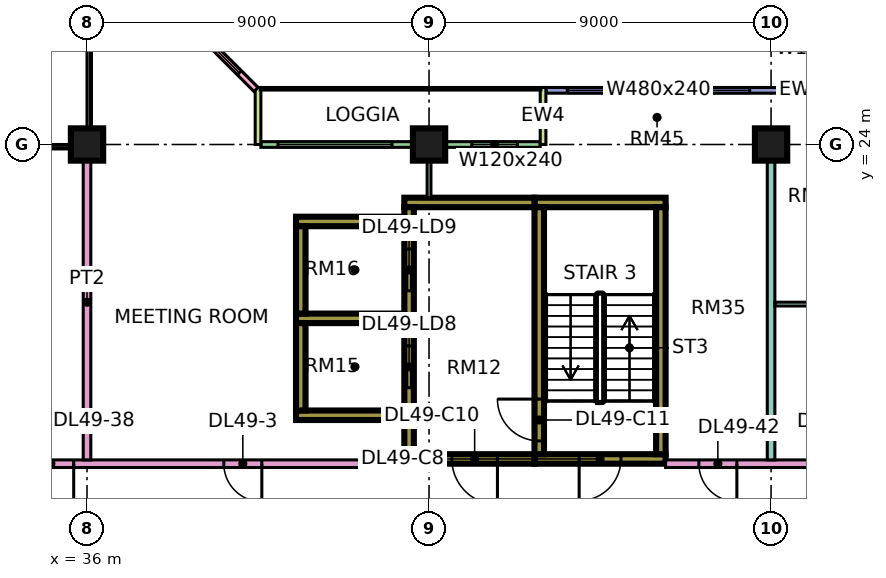
"""IFC4 building model, lengths in metres.
Left out: names, types, materials, properties, quantities, classifications, styles, units other than length and angle.
Written with IfcOpenShell. Run it as: python <this file> out.ifc"""

import sys

from ifc_helpers import new_model, si_unit, direction, frame, frame_2d, origin, origin_2d, place, context, subcontext, project, spatial, rectangle, extrude, element, fill, save


model = new_model("IFC4")
c1 = context("Model", 3, precision=1e-05, world=origin(), true_north=direction((0.0, 1.0)))
c2 = subcontext(c1, "Body", "Model", "MODEL_VIEW")
j1 = project(units=[si_unit("LENGTHUNIT", "METRE"), si_unit("PLANEANGLEUNIT", "RADIAN")], contexts=[c1])
p1 = place(None, origin())
s1 = spatial("IfcSite", under=j1, at=p1, CompositionType="ELEMENT")
p2 = place(p1, origin())
s2 = spatial("IfcBuilding", under=s1, at=p2, CompositionType="ELEMENT")
p3 = place(p2, frame((0.0, 0.0, 211.65)))
s3 = spatial("IfcBuildingStorey", under=s2, at=p3, CompositionType="ELEMENT", Elevation=211.65)
for number, where, z_axis, x_axis in (
    (1, (36.0, 24.0, 0.0), (0.0, 0.0, 1.0), (1.0, 0.0, 0.0)),
    (2, (45.0, 24.0, 0.0), (0.0, 0.0, 1.0), (1.0, 0.0, 0.0)),
    (3, (54.0, 24.0, 0.0), (0.0, 0.0, 1.0), (1.0, 0.0, 0.0)),
):
    element("IfcColumn", number, at=place(p3, frame(where, z_axis=z_axis, x_axis=x_axis)), inside=s3, PredefinedType="COLUMN", context=c2, shape_type="SweptSolid", body=[
        extrude(rectangle(XDim=0.85, YDim=0.85, at=origin_2d()), origin(), (0.0, 0.0, 1.0), 3.75),
    ])
p4 = place(p3, frame((47.775, 15.725, 0.0), z_axis=(0.0, 0.0, 1.0), x_axis=(1.0, 0.0, 0.0)))
e4 = element("IfcWall", 4, at=p4, inside=s3, PredefinedType="SHEAR", context=c2, shape_type="SweptSolid", body=[
    extrude(rectangle(XDim=3.45, YDim=0.25, at=frame_2d((1.725, 0.0))), origin(), (0.0, 0.0, 1.0), 3.75),
])
p5 = place(p4, frame((1.175, 0.0, 0.0)))
e5 = element("IfcOpeningElement", 5, at=p5, cuts=e4, PredefinedType="OPENING", context=c2, shape_type="SweptSolid", body=[
    extrude(rectangle(XDim=1.1, YDim=2.2, at=frame_2d((0.55, 1.1))), frame((0.0, 0.135, 0.0), z_axis=(0.0, -1.0, 0.0), x_axis=(1.0, 0.0, 0.0)), (0.0, 0.0, 1.0), 0.27),
])
p6 = place(p3, frame((47.775, 22.475, 0.0), z_axis=(0.0, 0.0, 1.0), x_axis=(1.0, 0.0, 0.0)))
e6 = element("IfcWall", 6, at=p6, inside=s3, PredefinedType="SHEAR", context=c2, shape_type="SweptSolid", body=[
    extrude(rectangle(XDim=3.45, YDim=0.25, at=frame_2d((1.725, 0.0))), origin(), (0.0, 0.0, 1.0), 3.75),
])
p7 = place(p3, frame((47.9, 15.85, 0.0), z_axis=(0.0, 0.0, 1.0), x_axis=(0.0, 1.0, 0.0)))
e7 = element("IfcWall", 7, at=p7, inside=s3, PredefinedType="SHEAR", context=c2, shape_type="SweptSolid", body=[
    extrude(rectangle(XDim=6.5, YDim=0.25, at=frame_2d((3.25, 0.0))), origin(), (0.0, 0.0, 1.0), 3.75),
])
p8 = place(p7, frame((0.35, 0.0, 0.0)))
e8 = element("IfcOpeningElement", 8, at=p8, cuts=e7, PredefinedType="OPENING", context=c2, shape_type="SweptSolid", body=[
    extrude(rectangle(XDim=1.1, YDim=2.2, at=frame_2d((0.55, 1.1))), frame((0.0, 0.135, 0.0), z_axis=(0.0, -1.0, 0.0), x_axis=(1.0, 0.0, 0.0)), (0.0, 0.0, 1.0), 0.27),
])
p9 = place(p3, frame((51.1, 15.85, 0.0), z_axis=(0.0, 0.0, 1.0), x_axis=(0.0, 1.0, 0.0)))
e9 = element("IfcWall", 9, at=p9, inside=s3, PredefinedType="SHEAR", context=c2, shape_type="SweptSolid", body=[
    extrude(rectangle(XDim=6.5, YDim=0.25, at=frame_2d((3.25, 0.0))), origin(), (0.0, 0.0, 1.0), 3.75),
])
p10 = place(p3, frame((44.35, 15.725, 0.0), z_axis=(0.0, 0.0, 1.0), x_axis=(1.0, 0.0, 0.0)))
e10 = element("IfcWall", 10, at=p10, inside=s3, PredefinedType="SHEAR", context=c2, shape_type="SweptSolid", body=[
    extrude(rectangle(XDim=3.425, YDim=0.25, at=frame_2d((1.712, 0.0))), origin(), (0.0, 0.0, 1.0), 3.75),
])
p11 = place(p10, frame((1.25, 0.0, 0.0)))
e11 = element("IfcOpeningElement", 11, at=p11, cuts=e10, PredefinedType="OPENING", context=c2, shape_type="SweptSolid", body=[
    extrude(rectangle(XDim=1.2, YDim=2.2, at=frame_2d((0.6, 1.1))), frame((0.0, 0.135, 0.0), z_axis=(0.0, -1.0, 0.0), x_axis=(1.0, 0.0, 0.0)), (0.0, 0.0, 1.0), 0.27),
])
p12 = place(p3, frame((44.35, 22.475, 0.0), z_axis=(0.0, 0.0, 1.0), x_axis=(1.0, 0.0, 0.0)))
e12 = element("IfcWall", 12, at=p12, inside=s3, PredefinedType="SHEAR", context=c2, shape_type="SweptSolid", body=[
    extrude(rectangle(XDim=3.425, YDim=0.25, at=frame_2d((1.712, 0.0))), origin(), (0.0, 0.0, 1.0), 3.75),
])
p13 = place(p3, frame((44.475, 15.85, 0.0), z_axis=(0.0, 0.0, 1.0), x_axis=(0.0, 1.0, 0.0)))
e13 = element("IfcWall", 13, at=p13, inside=s3, PredefinedType="SHEAR", context=c2, shape_type="SweptSolid", body=[
    extrude(rectangle(XDim=6.5, YDim=0.25, at=frame_2d((3.25, 0.0))), origin(), (0.0, 0.0, 1.0), 3.75),
])
p14 = place(p13, frame((1.75, 0.0, 0.0)))
e14 = element("IfcOpeningElement", 14, at=p14, cuts=e13, PredefinedType="OPENING", context=c2, shape_type="SweptSolid", body=[
    extrude(rectangle(XDim=1.1, YDim=2.2, at=frame_2d((0.55, 1.1))), frame((0.0, 0.135, 0.0), z_axis=(0.0, -1.0, 0.0), x_axis=(1.0, 0.0, 0.0)), (0.0, 0.0, 1.0), 0.27),
])
p15 = place(p13, frame((4.3, 0.0, 0.0)))
e15 = element("IfcOpeningElement", 15, at=p15, cuts=e13, PredefinedType="OPENING", context=c2, shape_type="SweptSolid", body=[
    extrude(rectangle(XDim=1.1, YDim=2.2, at=frame_2d((0.55, 1.1))), frame((0.0, 0.135, 0.0), z_axis=(0.0, -1.0, 0.0), x_axis=(1.0, 0.0, 0.0)), (0.0, 0.0, 1.0), 0.27),
])
for number, where, z_axis, x_axis in (
    (16, (41.5, 16.875, 0.0), (0.0, 0.0, 1.0), (1.0, 0.0, 0.0)),
    (17, (41.5, 19.425, 0.0), (0.0, 0.0, 1.0), (1.0, 0.0, 0.0)),
    (18, (41.5, 21.975, 0.0), (0.0, 0.0, 1.0), (1.0, 0.0, 0.0)),
):
    element("IfcWall", number, at=place(p3, frame(where, z_axis=z_axis, x_axis=x_axis)), inside=s3, PredefinedType="SHEAR", context=c2, shape_type="SweptSolid", body=[
        extrude(rectangle(XDim=2.85, YDim=0.25, at=frame_2d((1.425, 0.0))), origin(), (0.0, 0.0, 1.0), 3.75),
    ])
for number, where, z_axis, x_axis in (
    (19, (41.625, 17.0, 0.0), (0.0, 0.0, 1.0), (0.0, 1.0, 0.0)),
    (20, (41.625, 19.55, 0.0), (0.0, 0.0, 1.0), (0.0, 1.0, 0.0)),
):
    element("IfcWall", number, at=place(p3, frame(where, z_axis=z_axis, x_axis=x_axis)), inside=s3, PredefinedType="SHEAR", context=c2, shape_type="SweptSolid", body=[
        extrude(rectangle(XDim=2.3, YDim=0.25, at=frame_2d((1.15, 0.0))), origin(), (0.0, 0.0, 1.0), 3.75),
    ])
p16 = place(p3, frame((61.5, 25.425, 0.0), z_axis=(0.0, 0.0, 1.0), x_axis=(-1.0, 0.0, 0.0)))
e21 = element("IfcWall", 21, at=p16, inside=s3, PredefinedType="SOLIDWALL", context=c2, shape_type="SweptSolid", body=[
    extrude(rectangle(XDim=13.425, YDim=0.15, at=frame_2d((6.712, 0.0))), origin(), (0.0, 0.0, 1.0), 3.35),
])
p17 = place(p16, frame((0.75, 0.0, 0.45)))
e22 = element("IfcOpeningElement", 22, at=p17, cuts=e21, PredefinedType="OPENING", context=c2, shape_type="SweptSolid", body=[
    extrude(rectangle(XDim=3.0, YDim=2.4, at=frame_2d((1.5, 1.2))), frame((0.0, 0.085, 0.0), z_axis=(0.0, -1.0, 0.0), x_axis=(1.0, 0.0, 0.0)), (0.0, 0.0, 1.0), 0.17),
])
p18 = place(p16, frame((5.1, 0.0, 0.45)))
e23 = element("IfcOpeningElement", 23, at=p18, cuts=e21, PredefinedType="OPENING", context=c2, shape_type="SweptSolid", body=[
    extrude(rectangle(XDim=1.8, YDim=2.4, at=frame_2d((0.9, 1.2))), frame((0.0, 0.085, 0.0), z_axis=(0.0, -1.0, 0.0), x_axis=(1.0, 0.0, 0.0)), (0.0, 0.0, 1.0), 0.17),
])
p19 = place(p16, frame((8.062, 0.0, 0.45)))
e24 = element("IfcOpeningElement", 24, at=p19, cuts=e21, PredefinedType="OPENING", context=c2, shape_type="SweptSolid", body=[
    extrude(rectangle(XDim=4.8, YDim=2.4, at=frame_2d((2.4, 1.2))), frame((0.0, 0.085, 0.0), z_axis=(0.0, -1.0, 0.0), x_axis=(1.0, 0.0, 0.0)), (0.0, 0.0, 1.0), 0.17),
])
p20 = place(p3, frame((47.925, 24.0, 0.0), z_axis=(0.0, 0.0, 1.0), x_axis=(-1.0, 0.0, 0.0)))
e25 = element("IfcWall", 25, at=p20, inside=s3, PredefinedType="SOLIDWALL", context=c2, shape_type="SweptSolid", body=[
    extrude(rectangle(XDim=7.35, YDim=0.15, at=frame_2d((3.675, 0.0))), origin(), (0.0, 0.0, 1.0), 3.35),
])
p21 = place(p20, frame((0.6, 0.0, 0.45)))
e26 = element("IfcOpeningElement", 26, at=p21, cuts=e25, PredefinedType="OPENING", context=c2, shape_type="SweptSolid", body=[
    extrude(rectangle(XDim=1.2, YDim=2.4, at=frame_2d((0.6, 1.2))), frame((0.0, 0.085, 0.0), z_axis=(0.0, -1.0, 0.0), x_axis=(1.0, 0.0, 0.0)), (0.0, 0.0, 1.0), 0.17),
])
p22 = place(p20, frame((3.9, 0.0, 0.45)))
e27 = element("IfcOpeningElement", 27, at=p22, cuts=e25, PredefinedType="OPENING", context=c2, shape_type="SweptSolid", body=[
    extrude(rectangle(XDim=3.0, YDim=2.4, at=frame_2d((1.5, 1.2))), frame((0.0, 0.085, 0.0), z_axis=(0.0, -1.0, 0.0), x_axis=(1.0, 0.0, 0.0)), (0.0, 0.0, 1.0), 0.17),
])
for number, where, z_axis, x_axis in (
    (28, (48.0, 25.5, 0.0), (0.0, 0.0, 1.0), (0.0, -1.0, 0.0)),
    (29, (40.5, 25.5, 0.0), (0.0, 0.0, 1.0), (0.0, -1.0, 0.0)),
):
    element("IfcWall", number, at=place(p3, frame(where, z_axis=z_axis, x_axis=x_axis)), inside=s3, PredefinedType="SOLIDWALL", context=c2, shape_type="SweptSolid", body=[
        extrude(rectangle(XDim=1.5, YDim=0.15, at=frame_2d((0.75, 0.0))), origin(), (0.0, 0.0, 1.0), 3.35),
    ])
p23 = place(p3, frame((40.447, 25.447, 0.0), z_axis=(0.0, 0.0, 1.0), x_axis=(-0.707106781187, 0.707106781187, 0.0)))
e30 = element("IfcWall", 30, at=p23, inside=s3, PredefinedType="SOLIDWALL", context=c2, shape_type="SweptSolid", body=[
    extrude(rectangle(XDim=4.243, YDim=0.15, at=frame_2d((2.121, 0.0))), origin(), (0.0, 0.0, 1.0), 3.35),
])
p24 = place(p23, frame((0.621, 0.0, 0.45)))
e31 = element("IfcOpeningElement", 31, at=p24, cuts=e30, PredefinedType="OPENING", context=c2, shape_type="SweptSolid", body=[
    extrude(rectangle(XDim=3.0, YDim=2.4, at=frame_2d((1.5, 1.2))), frame((0.0, 0.085, 0.0), z_axis=(0.0, -1.0, 0.0), x_axis=(1.0, 0.0, 0.0)), (0.0, 0.0, 1.0), 0.17),
])
p25 = place(p3, frame((34.0, 15.6, 0.0), z_axis=(0.0, 0.0, 1.0), x_axis=(1.0, 0.0, 0.0)))
e32 = element("IfcWall", 32, at=p25, inside=s3, PredefinedType="PARTITIONING", context=c2, shape_type="SweptSolid", body=[
    extrude(rectangle(XDim=10.35, YDim=0.2, at=frame_2d((5.175, 0.0))), origin(), (0.0, 0.0, 1.0), 3.35),
])
p26 = place(p25, frame((5.6, 0.0, 0.0)))
e33 = element("IfcOpeningElement", 33, at=p26, cuts=e32, PredefinedType="OPENING", context=c2, shape_type="SweptSolid", body=[
    extrude(rectangle(XDim=1.0, YDim=2.1, at=frame_2d((0.5, 1.05))), frame((0.0, 0.11, 0.0), z_axis=(0.0, -1.0, 0.0), x_axis=(1.0, 0.0, 0.0)), (0.0, 0.0, 1.0), 0.22),
])
p27 = place(p25, frame((0.45, 0.0, 0.0)))
e34 = element("IfcOpeningElement", 34, at=p27, cuts=e32, PredefinedType="OPENING", context=c2, shape_type="SweptSolid", body=[
    extrude(rectangle(XDim=1.2, YDim=2.1, at=frame_2d((0.6, 1.05))), frame((0.0, 0.11, 0.0), z_axis=(0.0, -1.0, 0.0), x_axis=(1.0, 0.0, 0.0)), (0.0, 0.0, 1.0), 0.22),
])
p28 = place(p3, frame((36.0, 15.7, 0.0), z_axis=(0.0, 0.0, 1.0), x_axis=(0.0, 1.0, 0.0)))
e35 = element("IfcWall", 35, at=p28, inside=s3, PredefinedType="PARTITIONING", context=c2, shape_type="SweptSolid", body=[
    extrude(rectangle(XDim=8.3, YDim=0.2, at=frame_2d((4.15, 0.0))), origin(), (0.0, 0.0, 1.0), 3.35),
])
p29 = place(p3, frame((45.0, 22.6, 0.0), z_axis=(0.0, 0.0, 1.0), x_axis=(0.0, 1.0, 0.0)))
e36 = element("IfcWall", 36, at=p29, inside=s3, PredefinedType="PARTITIONING", context=c2, shape_type="SweptSolid", body=[
    extrude(rectangle(XDim=1.326, YDim=0.1, at=frame_2d((0.663, 0.0))), origin(), (0.0, 0.0, 1.0), 3.35),
])
p30 = place(p3, frame((51.225, 15.6, 0.0), z_axis=(0.0, 0.0, 1.0), x_axis=(1.0, 0.0, 0.0)))
e37 = element("IfcWall", 37, at=p30, inside=s3, PredefinedType="PARTITIONING", context=c2, shape_type="SweptSolid", body=[
    extrude(rectangle(XDim=11.701, YDim=0.2, at=frame_2d((5.851, 0.0))), origin(), (0.0, 0.0, 1.0), 3.35),
])
p31 = place(p30, frame((3.875, 0.0, 0.0)))
e38 = element("IfcOpeningElement", 38, at=p31, cuts=e37, PredefinedType="OPENING", context=c2, shape_type="SweptSolid", body=[
    extrude(rectangle(XDim=1.0, YDim=2.1, at=frame_2d((0.5, 1.05))), frame((0.0, 0.11, 0.0), z_axis=(0.0, -1.0, 0.0), x_axis=(1.0, 0.0, 0.0)), (0.0, 0.0, 1.0), 0.22),
])
p32 = place(p30, frame((0.875, 0.0, 0.0)))
e39 = element("IfcOpeningElement", 39, at=p32, cuts=e37, PredefinedType="OPENING", context=c2, shape_type="SweptSolid", body=[
    extrude(rectangle(XDim=1.0, YDim=2.1, at=frame_2d((0.5, 1.05))), frame((0.0, 0.11, 0.0), z_axis=(0.0, -1.0, 0.0), x_axis=(1.0, 0.0, 0.0)), (0.0, 0.0, 1.0), 0.22),
])
p33 = place(p3, frame((54.0, 15.7, 0.0), z_axis=(0.0, 0.0, 1.0), x_axis=(0.0, 1.0, 0.0)))
e40 = element("IfcWall", 40, at=p33, inside=s3, PredefinedType="PARTITIONING", context=c2, shape_type="SweptSolid", body=[
    extrude(rectangle(XDim=8.3, YDim=0.2, at=frame_2d((4.15, 0.0))), origin(), (0.0, 0.0, 1.0), 3.35),
])
p34 = place(p3, frame((54.1, 19.8, 0.0), z_axis=(0.0, 0.0, 1.0), x_axis=(1.0, 0.0, 0.0)))
e41 = element("IfcWall", 41, at=p34, inside=s3, PredefinedType="PARTITIONING", context=c2, shape_type="SweptSolid", body=[
    extrude(rectangle(XDim=2.85, YDim=0.1, at=frame_2d((1.425, 0.0))), origin(), (0.0, 0.0, 1.0), 3.35),
])
p35 = place(p18, origin())
e42 = element("IfcWindow", 42, at=p35, inside=s3, PartitioningType="SINGLE_PANEL", PredefinedType="WINDOW", context=c2, shape_type="SweptSolid", body=[
    extrude(rectangle(XDim=1.8, YDim=2.4, at=frame_2d((0.9, 1.2))), frame((0.0, 0.03, 0.0), z_axis=(0.0, -1.0, 0.0), x_axis=(1.0, 0.0, 0.0)), (0.0, 0.0, 1.0), 0.06),
])
fill(e23, e42)
p36 = place(p19, origin())
e43 = element("IfcWindow", 43, at=p36, inside=s3, PartitioningType="SINGLE_PANEL", PredefinedType="WINDOW", context=c2, shape_type="SweptSolid", body=[
    extrude(rectangle(XDim=4.8, YDim=2.4, at=frame_2d((2.4, 1.2))), frame((0.0, 0.03, 0.0), z_axis=(0.0, -1.0, 0.0), x_axis=(1.0, 0.0, 0.0)), (0.0, 0.0, 1.0), 0.06),
])
fill(e24, e43)
p37 = place(p21, origin())
e44 = element("IfcWindow", 44, at=p37, inside=s3, PartitioningType="SINGLE_PANEL", PredefinedType="WINDOW", context=c2, shape_type="SweptSolid", body=[
    extrude(rectangle(XDim=1.2, YDim=2.4, at=frame_2d((0.6, 1.2))), frame((0.0, 0.03, 0.0), z_axis=(0.0, -1.0, 0.0), x_axis=(1.0, 0.0, 0.0)), (0.0, 0.0, 1.0), 0.06),
])
fill(e26, e44)
p38 = place(p22, origin())
e45 = element("IfcWindow", 45, at=p38, inside=s3, PartitioningType="SINGLE_PANEL", PredefinedType="WINDOW", context=c2, shape_type="SweptSolid", body=[
    extrude(rectangle(XDim=3.0, YDim=2.4, at=frame_2d((1.5, 1.2))), frame((0.0, 0.03, 0.0), z_axis=(0.0, -1.0, 0.0), x_axis=(1.0, 0.0, 0.0)), (0.0, 0.0, 1.0), 0.06),
])
fill(e27, e45)
p39 = place(p24, origin())
e46 = element("IfcWindow", 46, at=p39, inside=s3, PartitioningType="SINGLE_PANEL", PredefinedType="WINDOW", context=c2, shape_type="SweptSolid", body=[
    extrude(rectangle(XDim=3.0, YDim=2.4, at=frame_2d((1.5, 1.2))), frame((0.0, 0.03, 0.0), z_axis=(0.0, -1.0, 0.0), x_axis=(1.0, 0.0, 0.0)), (0.0, 0.0, 1.0), 0.06),
])
fill(e31, e46)
p40 = place(p5, frame((1.1, 0.0, 0.0), z_axis=(0.0, 0.0, 1.0), x_axis=(-1.0, 0.0, 0.0)))
e47 = element("IfcDoor", 47, at=p40, inside=s3, OperationType="SINGLE_SWING_LEFT", PredefinedType="DOOR", context=c2, shape_type="SweptSolid", body=[
    extrude(rectangle(XDim=1.1, YDim=2.2, at=frame_2d((0.55, 1.1))), frame((0.0, 0.025, 0.0), z_axis=(0.0, -1.0, 0.0), x_axis=(1.0, 0.0, 0.0)), (0.0, 0.0, 1.0), 0.05),
])
fill(e5, e47)
p41 = place(p11, origin())
e48 = element("IfcDoor", 48, at=p41, inside=s3, OperationType="SINGLE_SWING_RIGHT", PredefinedType="DOOR", context=c2, shape_type="SweptSolid", body=[
    extrude(rectangle(XDim=1.2, YDim=2.2, at=frame_2d((0.6, 1.1))), frame((0.0, 0.025, 0.0), z_axis=(0.0, -1.0, 0.0), x_axis=(1.0, 0.0, 0.0)), (0.0, 0.0, 1.0), 0.05),
])
fill(e11, e48)
p42 = place(p8, frame((1.1, 0.0, 0.0), z_axis=(0.0, 0.0, 1.0), x_axis=(-1.0, 0.0, 0.0)))
e49 = element("IfcDoor", 49, at=p42, inside=s3, OperationType="SINGLE_SWING_RIGHT", PredefinedType="DOOR", context=c2, shape_type="SweptSolid", body=[
    extrude(rectangle(XDim=1.1, YDim=2.2, at=frame_2d((0.55, 1.1))), frame((0.0, 0.025, 0.0), z_axis=(0.0, -1.0, 0.0), x_axis=(1.0, 0.0, 0.0)), (0.0, 0.0, 1.0), 0.05),
])
fill(e8, e49)
p43 = place(p14, origin())
e50 = element("IfcDoor", 50, at=p43, inside=s3, OperationType="DOUBLE_DOOR_SLIDING", PredefinedType="DOOR", context=c2, shape_type="SweptSolid", body=[
    extrude(rectangle(XDim=1.1, YDim=2.2, at=frame_2d((0.55, 1.1))), frame((0.0, 0.025, 0.0), z_axis=(0.0, -1.0, 0.0), x_axis=(1.0, 0.0, 0.0)), (0.0, 0.0, 1.0), 0.05),
])
fill(e14, e50)
p44 = place(p15, origin())
e51 = element("IfcDoor", 51, at=p44, inside=s3, OperationType="DOUBLE_DOOR_SLIDING", PredefinedType="DOOR", context=c2, shape_type="SweptSolid", body=[
    extrude(rectangle(XDim=1.1, YDim=2.2, at=frame_2d((0.55, 1.1))), frame((0.0, 0.025, 0.0), z_axis=(0.0, -1.0, 0.0), x_axis=(1.0, 0.0, 0.0)), (0.0, 0.0, 1.0), 0.05),
])
fill(e15, e51)
p45 = place(p26, origin())
e52 = element("IfcDoor", 52, at=p45, inside=s3, OperationType="SINGLE_SWING_RIGHT", PredefinedType="DOOR", context=c2, shape_type="SweptSolid", body=[
    extrude(rectangle(XDim=1.0, YDim=2.1, at=frame_2d((0.5, 1.05))), frame((0.0, 0.025, 0.0), z_axis=(0.0, -1.0, 0.0), x_axis=(1.0, 0.0, 0.0)), (0.0, 0.0, 1.0), 0.05),
])
fill(e33, e52)
p46 = place(p27, origin())
e53 = element("IfcDoor", 53, at=p46, inside=s3, OperationType="SINGLE_SWING_RIGHT", PredefinedType="DOOR", context=c2, shape_type="SweptSolid", body=[
    extrude(rectangle(XDim=1.2, YDim=2.1, at=frame_2d((0.6, 1.05))), frame((0.0, 0.025, 0.0), z_axis=(0.0, -1.0, 0.0), x_axis=(1.0, 0.0, 0.0)), (0.0, 0.0, 1.0), 0.05),
])
fill(e34, e53)
p47 = place(p32, origin())
e54 = element("IfcDoor", 54, at=p47, inside=s3, OperationType="SINGLE_SWING_RIGHT", PredefinedType="DOOR", context=c2, shape_type="SweptSolid", body=[
    extrude(rectangle(XDim=1.0, YDim=2.1, at=frame_2d((0.5, 1.05))), frame((0.0, 0.025, 0.0), z_axis=(0.0, -1.0, 0.0), x_axis=(1.0, 0.0, 0.0)), (0.0, 0.0, 1.0), 0.05),
])
fill(e39, e54)
save(model, sys.argv[1])
